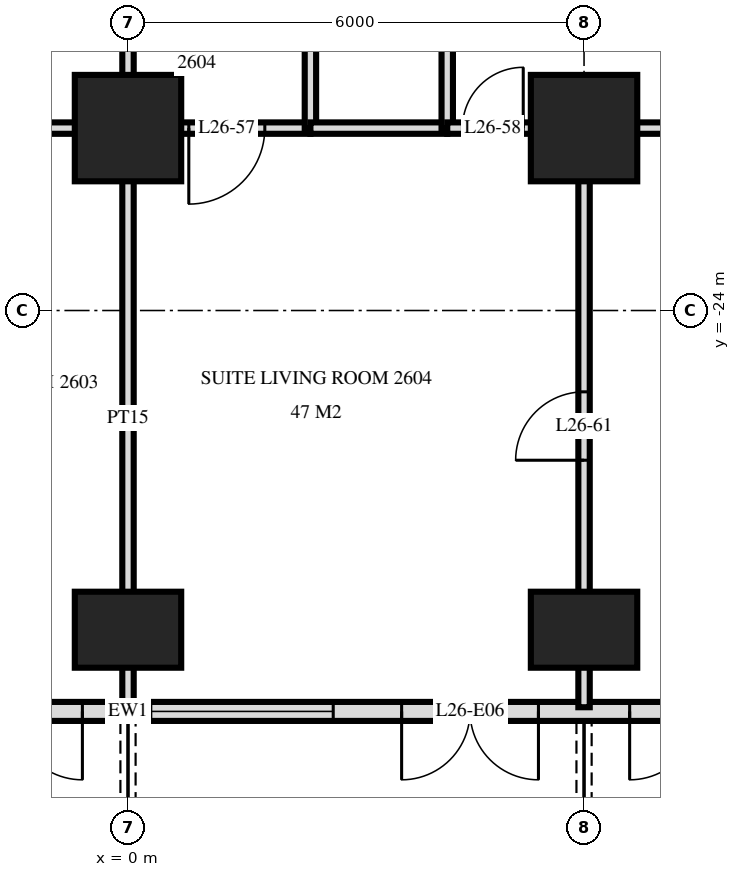
"""IFC4 building model, lengths in metres.
Left out: names, types, materials, properties, quantities, classifications, styles, units other than length and angle.
Written with IfcOpenShell. Run it as: python <this file> out.ifc"""

import sys

from ifc_helpers import new_model, si_unit, direction, frame, frame_2d, origin, origin_2d, place, context, subcontext, project, spatial, rectangle, extrude, element, fill, save


model = new_model("IFC4")
c1 = context("Model", 3, precision=1e-05, world=origin(), true_north=direction((0.0, 1.0)))
c2 = subcontext(c1, "Body", "Model", "MODEL_VIEW")
j1 = project(units=[si_unit("LENGTHUNIT", "METRE"), si_unit("PLANEANGLEUNIT", "RADIAN")], contexts=[c1])
p1 = place(None, origin())
s1 = spatial("IfcSite", under=j1, at=p1, CompositionType="ELEMENT")
p2 = place(p1, origin())
s2 = spatial("IfcBuilding", under=s1, at=p2, CompositionType="ELEMENT")
p3 = place(p2, frame((0.0, 0.0, 103.2)))
s3 = spatial("IfcBuildingStorey", under=s2, at=p3, CompositionType="ELEMENT", Elevation=103.2)
p4 = place(p3, frame((0.0, -28.2, 0.0), z_axis=(0.0, 0.0, 1.0), x_axis=(1.0, 0.0, 0.0)))
e1 = element("IfcColumn", 1, at=p4, inside=s3, PredefinedType="COLUMN", context=c2, shape_type="SweptSolid", body=[
    extrude(rectangle(XDim=1.4, YDim=1.0, at=origin_2d()), origin(), (0.0, 0.0, 1.0), 3.6),
])
p5 = place(p3, frame((0.0, -21.6, 0.0), z_axis=(0.0, 0.0, 1.0), x_axis=(1.0, 0.0, 0.0)))
e2 = element("IfcColumn", 2, at=p5, inside=s3, PredefinedType="COLUMN", context=c2, shape_type="SweptSolid", body=[
    extrude(rectangle(XDim=1.4, YDim=1.4, at=origin_2d()), origin(), (0.0, 0.0, 1.0), 3.6),
])
p6 = place(p3, frame((6.0, -28.2, 0.0), z_axis=(0.0, 0.0, 1.0), x_axis=(1.0, 0.0, 0.0)))
e3 = element("IfcColumn", 3, at=p6, inside=s3, PredefinedType="COLUMN", context=c2, shape_type="SweptSolid", body=[
    extrude(rectangle(XDim=1.4, YDim=1.0, at=origin_2d()), origin(), (0.0, 0.0, 1.0), 3.6),
])
p7 = place(p3, frame((6.0, -21.6, 0.0), z_axis=(0.0, 0.0, 1.0), x_axis=(1.0, 0.0, 0.0)))
e4 = element("IfcColumn", 4, at=p7, inside=s3, PredefinedType="COLUMN", context=c2, shape_type="SweptSolid", body=[
    extrude(rectangle(XDim=1.4, YDim=1.4, at=origin_2d()), origin(), (0.0, 0.0, 1.0), 3.6),
])
p8 = place(p3, frame((-28.775, -29.275, 0.0), z_axis=(0.0, 0.0, 1.0), x_axis=(1.0, 0.0, 0.0)))
e5 = element("IfcWall", 5, at=p8, inside=s3, PredefinedType="SOLIDWALL", context=c2, shape_type="SweptSolid", body=[
    extrude(rectangle(XDim=57.551, YDim=0.25, at=frame_2d((28.775, 0.0))), origin(), (0.0, 0.0, 1.0), 3.3),
])
p9 = place(p8, frame((0.575, 0.0, 0.0)))
e6 = element("IfcOpeningElement", 6, at=p9, cuts=e5, PredefinedType="OPENING", context=c2, shape_type="SweptSolid", body=[
    extrude(rectangle(XDim=1.8, YDim=2.4, at=frame_2d((0.9, 1.2))), frame((0.0, 0.135, 0.0), z_axis=(0.0, -1.0, 0.0), x_axis=(1.0, 0.0, 0.0)), (0.0, 0.0, 1.0), 0.27),
])
p10 = place(p8, frame((5.375, 0.0, 0.0)))
e7 = element("IfcOpeningElement", 7, at=p10, cuts=e5, PredefinedType="OPENING", context=c2, shape_type="SweptSolid", body=[
    extrude(rectangle(XDim=1.8, YDim=2.4, at=frame_2d((0.9, 1.2))), frame((0.0, 0.135, 0.0), z_axis=(0.0, -1.0, 0.0), x_axis=(1.0, 0.0, 0.0)), (0.0, 0.0, 1.0), 0.27),
])
p11 = place(p8, frame((8.075, 0.0, 0.3)))
e8 = element("IfcOpeningElement", 8, at=p11, cuts=e5, PredefinedType="OPENING", context=c2, shape_type="SweptSolid", body=[
    extrude(rectangle(XDim=2.4, YDim=2.1, at=frame_2d((1.2, 1.05))), frame((0.0, 0.135, 0.0), z_axis=(0.0, -1.0, 0.0), x_axis=(1.0, 0.0, 0.0)), (0.0, 0.0, 1.0), 0.27),
])
p12 = place(p8, frame((11.375, 0.0, 0.0)))
e9 = element("IfcOpeningElement", 9, at=p12, cuts=e5, PredefinedType="OPENING", context=c2, shape_type="SweptSolid", body=[
    extrude(rectangle(XDim=1.8, YDim=2.4, at=frame_2d((0.9, 1.2))), frame((0.0, 0.135, 0.0), z_axis=(0.0, -1.0, 0.0), x_axis=(1.0, 0.0, 0.0)), (0.0, 0.0, 1.0), 0.27),
])
p13 = place(p8, frame((14.075, 0.0, 0.3)))
e10 = element("IfcOpeningElement", 10, at=p13, cuts=e5, PredefinedType="OPENING", context=c2, shape_type="SweptSolid", body=[
    extrude(rectangle(XDim=2.4, YDim=2.1, at=frame_2d((1.2, 1.05))), frame((0.0, 0.135, 0.0), z_axis=(0.0, -1.0, 0.0), x_axis=(1.0, 0.0, 0.0)), (0.0, 0.0, 1.0), 0.27),
])
p14 = place(p8, frame((17.375, 0.0, 0.0)))
e11 = element("IfcOpeningElement", 11, at=p14, cuts=e5, PredefinedType="OPENING", context=c2, shape_type="SweptSolid", body=[
    extrude(rectangle(XDim=1.8, YDim=2.4, at=frame_2d((0.9, 1.2))), frame((0.0, 0.135, 0.0), z_axis=(0.0, -1.0, 0.0), x_axis=(1.0, 0.0, 0.0)), (0.0, 0.0, 1.0), 0.27),
])
p15 = place(p8, frame((20.075, 0.0, 0.3)))
e12 = element("IfcOpeningElement", 12, at=p15, cuts=e5, PredefinedType="OPENING", context=c2, shape_type="SweptSolid", body=[
    extrude(rectangle(XDim=2.4, YDim=2.1, at=frame_2d((1.2, 1.05))), frame((0.0, 0.135, 0.0), z_axis=(0.0, -1.0, 0.0), x_axis=(1.0, 0.0, 0.0)), (0.0, 0.0, 1.0), 0.27),
])
p16 = place(p8, frame((23.075, 0.0, 0.3)))
e13 = element("IfcOpeningElement", 13, at=p16, cuts=e5, PredefinedType="OPENING", context=c2, shape_type="SweptSolid", body=[
    extrude(rectangle(XDim=2.4, YDim=2.1, at=frame_2d((1.2, 1.05))), frame((0.0, 0.135, 0.0), z_axis=(0.0, -1.0, 0.0), x_axis=(1.0, 0.0, 0.0)), (0.0, 0.0, 1.0), 0.27),
])
p17 = place(p8, frame((26.375, 0.0, 0.0)))
e14 = element("IfcOpeningElement", 14, at=p17, cuts=e5, PredefinedType="OPENING", context=c2, shape_type="SweptSolid", body=[
    extrude(rectangle(XDim=1.8, YDim=2.4, at=frame_2d((0.9, 1.2))), frame((0.0, 0.135, 0.0), z_axis=(0.0, -1.0, 0.0), x_axis=(1.0, 0.0, 0.0)), (0.0, 0.0, 1.0), 0.27),
])
p18 = place(p8, frame((29.075, 0.0, 0.3)))
e15 = element("IfcOpeningElement", 15, at=p18, cuts=e5, PredefinedType="OPENING", context=c2, shape_type="SweptSolid", body=[
    extrude(rectangle(XDim=2.4, YDim=2.1, at=frame_2d((1.2, 1.05))), frame((0.0, 0.135, 0.0), z_axis=(0.0, -1.0, 0.0), x_axis=(1.0, 0.0, 0.0)), (0.0, 0.0, 1.0), 0.27),
])
p19 = place(p8, frame((32.375, 0.0, 0.0)))
e16 = element("IfcOpeningElement", 16, at=p19, cuts=e5, PredefinedType="OPENING", context=c2, shape_type="SweptSolid", body=[
    extrude(rectangle(XDim=1.8, YDim=2.4, at=frame_2d((0.9, 1.2))), frame((0.0, 0.135, 0.0), z_axis=(0.0, -1.0, 0.0), x_axis=(1.0, 0.0, 0.0)), (0.0, 0.0, 1.0), 0.27),
])
p20 = place(p8, frame((35.375, 0.0, 0.0)))
e17 = element("IfcOpeningElement", 17, at=p20, cuts=e5, PredefinedType="OPENING", context=c2, shape_type="SweptSolid", body=[
    extrude(rectangle(XDim=1.8, YDim=2.4, at=frame_2d((0.9, 1.2))), frame((0.0, 0.135, 0.0), z_axis=(0.0, -1.0, 0.0), x_axis=(1.0, 0.0, 0.0)), (0.0, 0.0, 1.0), 0.27),
])
p21 = place(p8, frame((38.075, 0.0, 0.3)))
e18 = element("IfcOpeningElement", 18, at=p21, cuts=e5, PredefinedType="OPENING", context=c2, shape_type="SweptSolid", body=[
    extrude(rectangle(XDim=2.4, YDim=2.1, at=frame_2d((1.2, 1.05))), frame((0.0, 0.135, 0.0), z_axis=(0.0, -1.0, 0.0), x_axis=(1.0, 0.0, 0.0)), (0.0, 0.0, 1.0), 0.27),
])
p22 = place(p8, frame((41.375, 0.0, 0.0)))
e19 = element("IfcOpeningElement", 19, at=p22, cuts=e5, PredefinedType="OPENING", context=c2, shape_type="SweptSolid", body=[
    extrude(rectangle(XDim=1.8, YDim=2.4, at=frame_2d((0.9, 1.2))), frame((0.0, 0.135, 0.0), z_axis=(0.0, -1.0, 0.0), x_axis=(1.0, 0.0, 0.0)), (0.0, 0.0, 1.0), 0.27),
])
p23 = place(p8, frame((44.075, 0.0, 0.3)))
e20 = element("IfcOpeningElement", 20, at=p23, cuts=e5, PredefinedType="OPENING", context=c2, shape_type="SweptSolid", body=[
    extrude(rectangle(XDim=2.4, YDim=2.1, at=frame_2d((1.2, 1.05))), frame((0.0, 0.135, 0.0), z_axis=(0.0, -1.0, 0.0), x_axis=(1.0, 0.0, 0.0)), (0.0, 0.0, 1.0), 0.27),
])
p24 = place(p8, frame((47.075, 0.0, 0.3)))
e21 = element("IfcOpeningElement", 21, at=p24, cuts=e5, PredefinedType="OPENING", context=c2, shape_type="SweptSolid", body=[
    extrude(rectangle(XDim=2.4, YDim=2.1, at=frame_2d((1.2, 1.05))), frame((0.0, 0.135, 0.0), z_axis=(0.0, -1.0, 0.0), x_axis=(1.0, 0.0, 0.0)), (0.0, 0.0, 1.0), 0.27),
])
p25 = place(p8, frame((50.375, 0.0, 0.0)))
e22 = element("IfcOpeningElement", 22, at=p25, cuts=e5, PredefinedType="OPENING", context=c2, shape_type="SweptSolid", body=[
    extrude(rectangle(XDim=1.8, YDim=2.4, at=frame_2d((0.9, 1.2))), frame((0.0, 0.135, 0.0), z_axis=(0.0, -1.0, 0.0), x_axis=(1.0, 0.0, 0.0)), (0.0, 0.0, 1.0), 0.27),
])
p26 = place(p8, frame((53.375, 0.0, 0.0)))
e23 = element("IfcOpeningElement", 23, at=p26, cuts=e5, PredefinedType="OPENING", context=c2, shape_type="SweptSolid", body=[
    extrude(rectangle(XDim=1.8, YDim=2.4, at=frame_2d((0.9, 1.2))), frame((0.0, 0.135, 0.0), z_axis=(0.0, -1.0, 0.0), x_axis=(1.0, 0.0, 0.0)), (0.0, 0.0, 1.0), 0.27),
])
p27 = place(p3, frame((6.0, -29.22, 0.0), z_axis=(0.0, 0.0, 1.0), x_axis=(0.0, 1.0, 0.0)))
e24 = element("IfcWall", 24, at=p27, inside=s3, PredefinedType="PARTITIONING", context=c2, shape_type="SweptSolid", body=[
    extrude(rectangle(XDim=7.62, YDim=0.15, at=frame_2d((3.81, 0.0))), origin(), (0.0, 0.0, 1.0), 3.32),
])
p28 = place(p27, frame((3.25, 0.0, 0.0)))
e25 = element("IfcOpeningElement", 25, at=p28, cuts=e24, PredefinedType="OPENING", context=c2, shape_type="SweptSolid", body=[
    extrude(rectangle(XDim=0.9, YDim=2.1, at=frame_2d((0.45, 1.05))), frame((0.0, 0.085, 0.0), z_axis=(0.0, -1.0, 0.0), x_axis=(1.0, 0.0, 0.0)), (0.0, 0.0, 1.0), 0.17),
])
p29 = place(p3, frame((4.2, -21.6, 0.0), z_axis=(0.0, 0.0, 1.0), x_axis=(0.0, 1.0, 0.0)))
e26 = element("IfcWall", 26, at=p29, inside=s3, PredefinedType="PLUMBINGWALL", context=c2, shape_type="SweptSolid", body=[
    extrude(rectangle(XDim=3.6, YDim=0.15, at=frame_2d((1.8, 0.0))), origin(), (0.0, 0.0, 1.0), 3.32),
])
p30 = place(p3, frame((2.4, -21.6, 0.0), z_axis=(0.0, 0.0, 1.0), x_axis=(0.0, 1.0, 0.0)))
e27 = element("IfcWall", 27, at=p30, inside=s3, PredefinedType="PARTITIONING", context=c2, shape_type="SweptSolid", body=[
    extrude(rectangle(XDim=3.6, YDim=0.15, at=frame_2d((1.8, 0.0))), origin(), (0.0, 0.0, 1.0), 3.32),
])
p31 = place(p30, frame((1.3, 0.0, 0.0)))
e28 = element("IfcOpeningElement", 28, at=p31, cuts=e27, PredefinedType="OPENING", context=c2, shape_type="SweptSolid", body=[
    extrude(rectangle(XDim=1.0, YDim=2.1, at=frame_2d((0.5, 1.05))), frame((0.0, 0.085, 0.0), z_axis=(0.0, -1.0, 0.0), x_axis=(1.0, 0.0, 0.0)), (0.0, 0.0, 1.0), 0.17),
])
p32 = place(p3, frame((0.0, -21.6, 0.0), z_axis=(0.0, 0.0, 1.0), x_axis=(0.0, 1.0, 0.0)))
e29 = element("IfcWall", 29, at=p32, inside=s3, PredefinedType="PARTITIONING", context=c2, shape_type="SweptSolid", body=[
    extrude(rectangle(XDim=3.6, YDim=0.15, at=frame_2d((1.8, 0.0))), origin(), (0.0, 0.0, 1.0), 3.32),
])
p33 = place(p3, frame((0.0, -29.22, 0.0), z_axis=(0.0, 0.0, 1.0), x_axis=(0.0, 1.0, 0.0)))
e30 = element("IfcWall", 30, at=p33, inside=s3, PredefinedType="PARTITIONING", context=c2, shape_type="SweptSolid", body=[
    extrude(rectangle(XDim=7.62, YDim=0.15, at=frame_2d((3.81, 0.0))), origin(), (0.0, 0.0, 1.0), 3.32),
])
p34 = place(p3, frame((0.0, -21.6, 0.0), z_axis=(0.0, 0.0, 1.0), x_axis=(1.0, 0.0, 0.0)))
e31 = element("IfcWall", 31, at=p34, inside=s3, PredefinedType="PARTITIONING", context=c2, shape_type="SweptSolid", body=[
    extrude(rectangle(XDim=2.4, YDim=0.15, at=frame_2d((1.2, 0.0))), origin(), (0.0, 0.0, 1.0), 3.32),
])
p35 = place(p34, frame((0.8, 0.0, 0.0)))
e32 = element("IfcOpeningElement", 32, at=p35, cuts=e31, PredefinedType="OPENING", context=c2, shape_type="SweptSolid", body=[
    extrude(rectangle(XDim=1.0, YDim=2.1, at=frame_2d((0.5, 1.05))), frame((0.0, 0.085, 0.0), z_axis=(0.0, -1.0, 0.0), x_axis=(1.0, 0.0, 0.0)), (0.0, 0.0, 1.0), 0.17),
])
p36 = place(p3, frame((-1.7, -21.6, 0.0), z_axis=(0.0, 0.0, 1.0), x_axis=(1.0, 0.0, 0.0)))
e33 = element("IfcWall", 33, at=p36, inside=s3, PredefinedType="PARTITIONING", context=c2, shape_type="SweptSolid", body=[
    extrude(rectangle(XDim=1.7, YDim=0.15, at=frame_2d((0.85, 0.0))), origin(), (0.0, 0.0, 1.0), 3.32),
])
p37 = place(p3, frame((4.2, -21.6, 0.0), z_axis=(0.0, 0.0, 1.0), x_axis=(1.0, 0.0, 0.0)))
e34 = element("IfcWall", 34, at=p37, inside=s3, PredefinedType="PARTITIONING", context=c2, shape_type="SweptSolid", body=[
    extrude(rectangle(XDim=7.8, YDim=0.15, at=frame_2d((3.9, 0.0))), origin(), (0.0, 0.0, 1.0), 3.32),
])
p38 = place(p37, frame((0.2, 0.0, 0.0)))
e35 = element("IfcOpeningElement", 35, at=p38, cuts=e34, PredefinedType="OPENING", context=c2, shape_type="SweptSolid", body=[
    extrude(rectangle(XDim=0.8, YDim=2.1, at=frame_2d((0.4, 1.05))), frame((0.0, 0.085, 0.0), z_axis=(0.0, -1.0, 0.0), x_axis=(1.0, 0.0, 0.0)), (0.0, 0.0, 1.0), 0.17),
])
p39 = place(p37, frame((4.03, 0.0, 0.0)))
e36 = element("IfcOpeningElement", 36, at=p39, cuts=e34, PredefinedType="OPENING", context=c2, shape_type="SweptSolid", body=[
    extrude(rectangle(XDim=0.9, YDim=2.1, at=frame_2d((0.45, 1.05))), frame((0.0, 0.085, 0.0), z_axis=(0.0, -1.0, 0.0), x_axis=(1.0, 0.0, 0.0)), (0.0, 0.0, 1.0), 0.17),
])
p40 = place(p37, frame((6.1, 0.0, 0.0)))
e37 = element("IfcOpeningElement", 37, at=p40, cuts=e34, PredefinedType="OPENING", context=c2, shape_type="SweptSolid", body=[
    extrude(rectangle(XDim=0.9, YDim=2.1, at=frame_2d((0.45, 1.05))), frame((0.0, 0.085, 0.0), z_axis=(0.0, -1.0, 0.0), x_axis=(1.0, 0.0, 0.0)), (0.0, 0.0, 1.0), 0.17),
])
p41 = place(p3, frame((2.4, -21.6, 0.0), z_axis=(0.0, 0.0, 1.0), x_axis=(1.0, 0.0, 0.0)))
e38 = element("IfcWall", 38, at=p41, inside=s3, PredefinedType="PLUMBINGWALL", context=c2, shape_type="SweptSolid", body=[
    extrude(rectangle(XDim=1.8, YDim=0.15, at=frame_2d((0.9, 0.0))), origin(), (0.0, 0.0, 1.0), 3.32),
])
p42 = place(p17, frame((0.9, 0.0, 0.0), z_axis=(0.0, 0.0, 1.0), x_axis=(-1.0, 0.0, 0.0)))
e39 = element("IfcDoor", 39, at=p42, inside=s3, OperationType="DOUBLE_DOOR_SINGLE_SWING", PredefinedType="DOOR", context=c2, shape_type="SweptSolid", body=[
    extrude(rectangle(XDim=1.8, YDim=2.4, at=frame_2d((0.0, 1.2))), frame((0.0, -0.025, 0.0), z_axis=(0.0, 1.0, 0.0), x_axis=(-1.0, 0.0, 0.0)), (0.0, 0.0, 1.0), 0.05),
])
fill(e14, e39)
p43 = place(p18, origin())
e40 = element("IfcWindow", 40, at=p43, inside=s3, PartitioningType="SINGLE_PANEL", PredefinedType="WINDOW", context=c2, shape_type="SweptSolid", body=[
    extrude(rectangle(XDim=2.4, YDim=2.1, at=frame_2d((1.2, 1.05))), frame((0.0, 0.03, 0.0), z_axis=(0.0, -1.0, 0.0), x_axis=(1.0, 0.0, 0.0)), (0.0, 0.0, 1.0), 0.06),
])
fill(e15, e40)
p44 = place(p19, frame((0.9, 0.0, 0.0), z_axis=(0.0, 0.0, 1.0), x_axis=(-1.0, 0.0, 0.0)))
e41 = element("IfcDoor", 41, at=p44, inside=s3, OperationType="DOUBLE_DOOR_SINGLE_SWING", PredefinedType="DOOR", context=c2, shape_type="SweptSolid", body=[
    extrude(rectangle(XDim=1.8, YDim=2.4, at=frame_2d((0.0, 1.2))), frame((0.0, -0.025, 0.0), z_axis=(0.0, 1.0, 0.0), x_axis=(-1.0, 0.0, 0.0)), (0.0, 0.0, 1.0), 0.05),
])
fill(e16, e41)
p45 = place(p20, frame((0.9, 0.0, 0.0), z_axis=(0.0, 0.0, 1.0), x_axis=(-1.0, 0.0, 0.0)))
e42 = element("IfcDoor", 42, at=p45, inside=s3, OperationType="DOUBLE_DOOR_SINGLE_SWING", PredefinedType="DOOR", context=c2, shape_type="SweptSolid", body=[
    extrude(rectangle(XDim=1.8, YDim=2.4, at=frame_2d((0.0, 1.2))), frame((0.0, -0.025, 0.0), z_axis=(0.0, 1.0, 0.0), x_axis=(-1.0, 0.0, 0.0)), (0.0, 0.0, 1.0), 0.05),
])
fill(e17, e42)
p46 = place(p35, frame((0.5, 0.0, 0.0), z_axis=(0.0, 0.0, 1.0), x_axis=(-1.0, 0.0, 0.0)))
e43 = element("IfcDoor", 43, at=p46, inside=s3, OperationType="SINGLE_SWING_LEFT", PredefinedType="DOOR", context=c2, shape_type="SweptSolid", body=[
    extrude(rectangle(XDim=1.0, YDim=2.1, at=frame_2d((0.0, 1.05))), frame((0.0, -0.025, 0.0), z_axis=(0.0, 1.0, 0.0), x_axis=(-1.0, 0.0, 0.0)), (0.0, 0.0, 1.0), 0.05),
])
fill(e32, e43)
p47 = place(p38, origin())
e44 = element("IfcDoor", 44, at=p47, inside=s3, OperationType="SINGLE_SWING_LEFT", PredefinedType="DOOR", context=c2, shape_type="SweptSolid", body=[
    extrude(rectangle(XDim=0.8, YDim=2.1, at=frame_2d((0.4, 1.05))), frame((0.0, 0.025, 0.0), z_axis=(0.0, -1.0, 0.0), x_axis=(1.0, 0.0, 0.0)), (0.0, 0.0, 1.0), 0.05),
])
fill(e35, e44)
p48 = place(p28, origin())
e45 = element("IfcDoor", 45, at=p48, inside=s3, OperationType="SINGLE_SWING_RIGHT", PredefinedType="DOOR", context=c2, shape_type="SweptSolid", body=[
    extrude(rectangle(XDim=0.9, YDim=2.1, at=frame_2d((0.45, 1.05))), frame((0.0, 0.025, 0.0), z_axis=(0.0, -1.0, 0.0), x_axis=(1.0, 0.0, 0.0)), (0.0, 0.0, 1.0), 0.05),
])
fill(e25, e45)
save(model, sys.argv[1])
